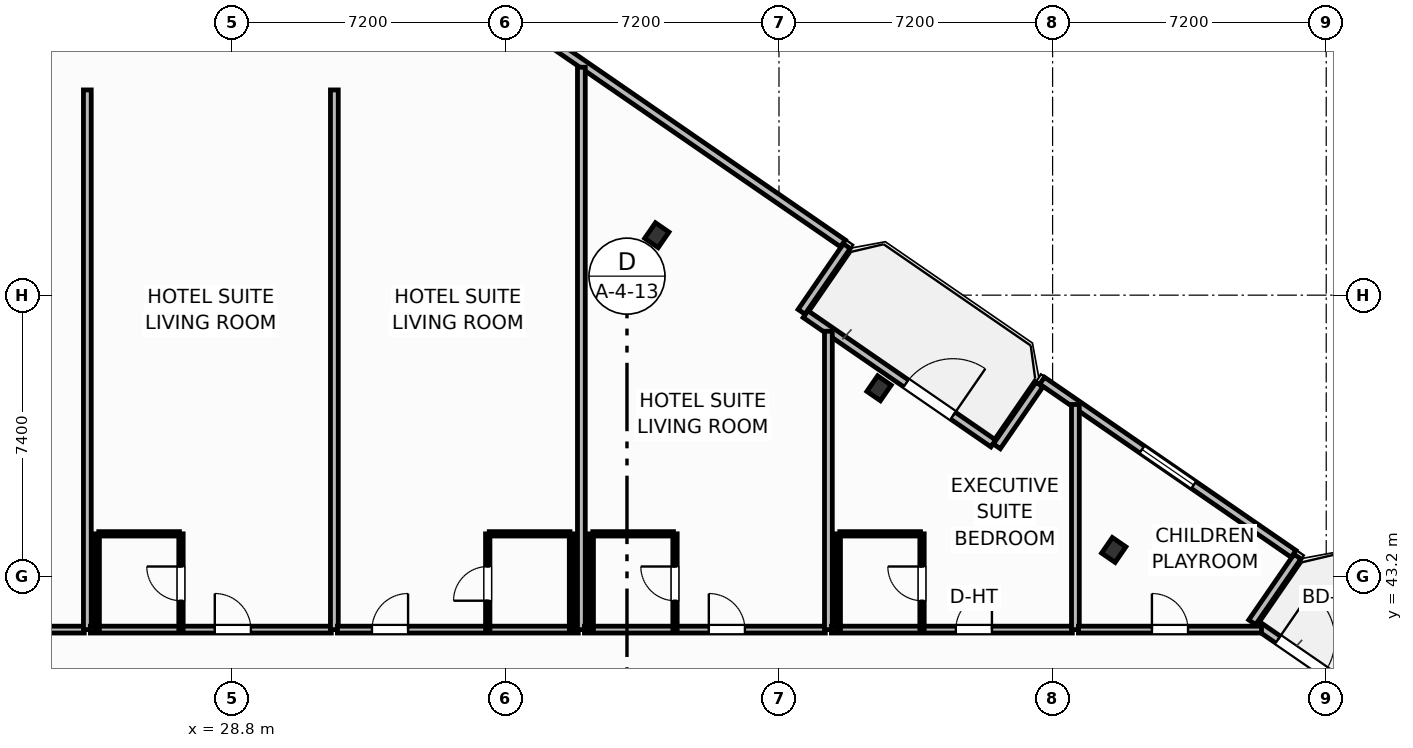
"""IFC4 building model, lengths in metres.
Left out: names, types, materials, properties, quantities, classifications, styles, units other than length and angle.
Written with IfcOpenShell. Run it as: python <this file> out.ifc"""

import sys

from ifc_helpers import new_model, si_unit, direction, frame, frame_2d, origin, origin_2d, place, context, subcontext, project, spatial, rectangle, i_section, extrude, element, fill, save


model = new_model("IFC4")
c1 = context("Model", 3, precision=1e-05, world=origin(), true_north=direction((0.0, 1.0)))
c2 = subcontext(c1, "Body", "Model", "MODEL_VIEW")
j1 = project(units=[si_unit("LENGTHUNIT", "METRE"), si_unit("PLANEANGLEUNIT", "RADIAN")], contexts=[c1])
p1 = place(None, origin())
s1 = spatial("IfcSite", under=j1, at=p1, CompositionType="ELEMENT")
p2 = place(p1, origin())
s2 = spatial("IfcBuilding", under=s1, at=p2, CompositionType="ELEMENT")
p3 = place(p2, frame((0.0, 0.0, 60.3)))
s3 = spatial("IfcBuildingStorey", under=s2, at=p3, CompositionType="ELEMENT", Elevation=60.3)
for number, where, z_axis, x_axis in (
    (1, (52.009, 43.896, 0.0), (0.0, 0.0, 1.0), (0.824, -0.567, 0.0)),
    (2, (45.833, 48.15, 0.0), (0.0, 0.0, 1.0), (0.824, -0.567, 0.0)),
    (3, (39.985, 52.177, 0.0), (0.0, 0.0, 1.0), (0.824, -0.567, 0.0)),
):
    element("IfcColumn", number, at=place(p3, frame(where, z_axis=z_axis, x_axis=x_axis)), inside=s3, PredefinedType="COLUMN", context=c2, shape_type="SweptSolid", body=[
        extrude(i_section(OverallWidth=0.432, OverallDepth=0.498, WebThickness=0.056, FlangeThickness=0.089, FilletRadius=0.025, at=origin_2d()), origin(), (0.0, 0.0, 1.0), 3.7),
    ])
p4 = place(p3, frame((43.898, 50.102, 0.0), z_axis=(0.0, 0.0, 1.0), x_axis=(0.823534636215, -0.567265989598, 0.0)))
e4 = element("IfcWall", 4, at=p4, inside=s3, PredefinedType="SOLIDWALL", context=c2, shape_type="SweptSolid", body=[
    extrude(rectangle(XDim=6.0, YDim=0.22, at=frame_2d((3.0, 0.0))), origin(), (0.0, 0.0, 1.0), 2.73),
])
p5 = place(p4, frame((3.212, 0.0, 0.0)))
e5 = element("IfcOpeningElement", 5, at=p5, cuts=e4, PredefinedType="OPENING", context=c2, shape_type="SweptSolid", body=[
    extrude(rectangle(XDim=1.5, YDim=2.25, at=frame_2d((0.75, 1.125))), frame((0.0, 0.12, 0.0), z_axis=(0.0, -1.0, 0.0), x_axis=(1.0, 0.0, 0.0)), (0.0, 0.0, 1.0), 0.24),
])
p6 = place(p3, frame((55.757, 41.933, 0.0), z_axis=(0.0, 0.0, 1.0), x_axis=(0.823534636215, -0.567265989598, 0.0)))
e6 = element("IfcWall", 6, at=p6, inside=s3, PredefinedType="SOLIDWALL", context=c2, shape_type="SweptSolid", body=[
    extrude(rectangle(XDim=6.0, YDim=0.22, at=frame_2d((3.0, 0.0))), origin(), (0.0, 0.0, 1.0), 2.73),
])
p7 = place(p6, frame((0.696, 0.0, 0.0)))
e7 = element("IfcOpeningElement", 7, at=p7, cuts=e6, PredefinedType="OPENING", context=c2, shape_type="SweptSolid", body=[
    extrude(rectangle(XDim=1.5, YDim=2.25, at=frame_2d((0.75, 1.125))), frame((0.0, 0.12, 0.0), z_axis=(0.0, -1.0, 0.0), x_axis=(1.0, 0.0, 0.0)), (0.0, 0.0, 1.0), 0.24),
])
p8 = place(p3, frame((55.653, 41.993, 0.0), z_axis=(0.0, 0.0, 1.0), x_axis=(0.567273696173, 0.823529327729, 0.0)))
e8 = element("IfcWall", 8, at=p8, inside=s3, PredefinedType="SOLIDWALL", context=c2, shape_type="SweptSolid", body=[
    extrude(rectangle(XDim=2.1, YDim=0.22, at=frame_2d((1.05, 0.0))), origin(), (0.0, 0.0, 1.0), 2.73),
])
p9 = place(p3, frame((56.741, 43.793, 0.0), z_axis=(0.0, 0.0, 1.0), x_axis=(-0.823530942962, 0.56727135128, 0.0)))
e9 = element("IfcWall", 9, at=p9, inside=s3, PredefinedType="SOLIDWALL", context=c2, shape_type="SweptSolid", body=[
    extrude(rectangle(XDim=8.035, YDim=0.22, at=frame_2d((4.018, 0.0))), origin(), (0.0, 0.0, 1.0), 2.73),
])
p10 = place(p9, frame((3.192, 0.0, 0.8)))
e10 = element("IfcOpeningElement", 10, at=p10, cuts=e9, PredefinedType="OPENING", context=c2, shape_type="SweptSolid", body=[
    extrude(rectangle(XDim=1.65, YDim=1.65, at=frame_2d((0.825, 0.825))), frame((0.0, 0.12, 0.0), z_axis=(0.0, -1.0, 0.0), x_axis=(1.0, 0.0, 0.0)), (0.0, 0.0, 1.0), 0.24),
])
p11 = place(p3, frame((50.053, 48.248, 0.0), z_axis=(0.0, 0.0, 1.0), x_axis=(-0.567273565974, -0.823529417415, 0.0)))
e11 = element("IfcWall", 11, at=p11, inside=s3, PredefinedType="SOLIDWALL", context=c2, shape_type="SweptSolid", body=[
    extrude(rectangle(XDim=1.975, YDim=0.22, at=frame_2d((0.988, 0.0))), origin(), (0.0, 0.0, 1.0), 2.73),
])
p12 = place(p3, frame((43.794, 50.161, 0.0), z_axis=(0.0, 0.0, 1.0), x_axis=(0.567352541689, 0.823475010816, 0.0)))
e12 = element("IfcWall", 12, at=p12, inside=s3, PredefinedType="SOLIDWALL", context=c2, shape_type="SweptSolid", body=[
    extrude(rectangle(XDim=2.1, YDim=0.22, at=frame_2d((1.05, 0.0))), origin(), (0.0, 0.0, 1.0), 2.73),
])
p13 = place(p3, frame((44.882, 51.962, 0.0), z_axis=(0.0, 0.0, 1.0), x_axis=(-0.823534427573, 0.567266292497, 0.0)))
e13 = element("IfcWall", 13, at=p13, inside=s3, PredefinedType="SOLIDWALL", context=c2, shape_type="SweptSolid", body=[
    extrude(rectangle(XDim=23.147, YDim=0.22, at=frame_2d((11.574, 0.0))), origin(), (0.0, 0.0, 1.0), 2.73),
])
p14 = place(p13, frame((10.749, 0.0, 0.8)))
e14 = element("IfcOpeningElement", 14, at=p14, cuts=e13, PredefinedType="OPENING", context=c2, shape_type="SweptSolid", body=[
    extrude(rectangle(XDim=1.65, YDim=1.65, at=frame_2d((0.825, 0.825))), frame((0.0, 0.12, 0.0), z_axis=(0.0, -1.0, 0.0), x_axis=(1.0, 0.0, 0.0)), (0.0, 0.0, 1.0), 0.24),
])
p15 = place(p3, frame((3.176, 41.8, 0.0), z_axis=(0.0, 0.0, 1.0), x_axis=(1.0, 0.0, 0.0)))
e15 = element("IfcWall", 15, at=p15, inside=s3, PredefinedType="PARTITIONING", context=c2, shape_type="SweptSolid", body=[
    extrude(rectangle(XDim=21.744, YDim=0.18, at=frame_2d((10.872, 0.0))), origin(), (0.0, 0.0, 1.0), 3.45),
])
p16 = place(p15, frame((18.101, 0.0, 0.0)))
e16 = element("IfcOpeningElement", 16, at=p16, cuts=e15, PredefinedType="OPENING", context=c2, shape_type="SweptSolid", body=[
    extrude(rectangle(XDim=0.95, YDim=2.15, at=frame_2d((0.475, 1.075))), frame((0.0, 0.1, 0.0), z_axis=(0.0, -1.0, 0.0), x_axis=(1.0, 0.0, 0.0)), (0.0, 0.0, 1.0), 0.2),
])
p17 = place(p3, frame((25.0, 41.8, 0.0), z_axis=(0.0, 0.0, 1.0), x_axis=(0.0, 1.0, 0.0)))
e17 = element("IfcWall", 17, at=p17, inside=s3, PredefinedType="PARTITIONING", context=c2, shape_type="SweptSolid", body=[
    extrude(rectangle(XDim=14.2, YDim=0.205, at=frame_2d((7.1, 0.0))), origin(), (0.0, 0.0, 1.0), 3.45),
])
p18 = place(p3, frame((25.08, 41.8, 0.0), z_axis=(0.0, 0.0, 1.0), x_axis=(1.0, 0.0, 0.0)))
e18 = element("IfcWall", 18, at=p18, inside=s3, PredefinedType="PARTITIONING", context=c2, shape_type="SweptSolid", body=[
    extrude(rectangle(XDim=6.34, YDim=0.18, at=frame_2d((3.17, 0.0))), origin(), (0.0, 0.0, 1.0), 3.45),
])
p19 = place(p18, frame((3.274, 0.0, 0.0)))
e19 = element("IfcOpeningElement", 19, at=p19, cuts=e18, PredefinedType="OPENING", context=c2, shape_type="SweptSolid", body=[
    extrude(rectangle(XDim=0.95, YDim=2.15, at=frame_2d((0.475, 1.075))), frame((0.0, 0.1, 0.0), z_axis=(0.0, -1.0, 0.0), x_axis=(1.0, 0.0, 0.0)), (0.0, 0.0, 1.0), 0.2),
])
p20 = place(p3, frame((25.3, 44.32, 0.0), z_axis=(0.0, 0.0, 1.0), x_axis=(1.0, 0.0, 0.0)))
e20 = element("IfcWall", 20, at=p20, inside=s3, PredefinedType="PARTITIONING", context=c2, shape_type="SweptSolid", body=[
    extrude(rectangle(XDim=2.124, YDim=0.115, at=frame_2d((1.062, 0.0))), origin(), (0.0, 0.0, 1.0), 3.45),
])
p21 = place(p3, frame((27.464, 41.8, 0.0), z_axis=(0.0, 0.0, 1.0), x_axis=(0.0, 1.0, 0.0)))
e21 = element("IfcWall", 21, at=p21, inside=s3, PredefinedType="PARTITIONING", context=c2, shape_type="SweptSolid", body=[
    extrude(rectangle(XDim=2.52, YDim=0.115, at=frame_2d((1.26, 0.0))), origin(), (0.0, 0.0, 1.0), 3.45),
])
p22 = place(p21, frame((0.76, 0.0, 0.0)))
e22 = element("IfcOpeningElement", 22, at=p22, cuts=e21, PredefinedType="OPENING", context=c2, shape_type="SweptSolid", body=[
    extrude(rectangle(XDim=0.9, YDim=2.05, at=frame_2d((0.45, 1.025))), frame((0.0, 0.067, 0.0), z_axis=(0.0, -1.0, 0.0), x_axis=(1.0, 0.0, 0.0)), (0.0, 0.0, 1.0), 0.135),
])
p23 = place(p3, frame((25.26, 41.8, 0.0), z_axis=(0.0, 0.0, 1.0), x_axis=(0.0, 1.0, 0.0)))
e23 = element("IfcWall", 23, at=p23, inside=s3, PredefinedType="PARTITIONING", context=c2, shape_type="SweptSolid", body=[
    extrude(rectangle(XDim=2.52, YDim=0.115, at=frame_2d((1.26, 0.0))), origin(), (0.0, 0.0, 1.0), 3.45),
])
p24 = place(p3, frame((31.5, 41.8, 0.0), z_axis=(0.0, 0.0, 1.0), x_axis=(0.0, 1.0, 0.0)))
e24 = element("IfcWall", 24, at=p24, inside=s3, PredefinedType="PARTITIONING", context=c2, shape_type="SweptSolid", body=[
    extrude(rectangle(XDim=14.2, YDim=0.205, at=frame_2d((7.1, 0.0))), origin(), (0.0, 0.0, 1.0), 3.45),
])
p25 = place(p3, frame((31.58, 41.8, 0.0), z_axis=(0.0, 0.0, 1.0), x_axis=(1.0, 0.0, 0.0)))
e25 = element("IfcWall", 25, at=p25, inside=s3, PredefinedType="PARTITIONING", context=c2, shape_type="SweptSolid", body=[
    extrude(rectangle(XDim=6.34, YDim=0.18, at=frame_2d((3.17, 0.0))), origin(), (0.0, 0.0, 1.0), 3.45),
])
p26 = place(p25, frame((0.91, 0.0, 0.0)))
e26 = element("IfcOpeningElement", 26, at=p26, cuts=e25, PredefinedType="OPENING", context=c2, shape_type="SweptSolid", body=[
    extrude(rectangle(XDim=0.95, YDim=2.15, at=frame_2d((0.475, 1.075))), frame((0.0, 0.1, 0.0), z_axis=(0.0, -1.0, 0.0), x_axis=(1.0, 0.0, 0.0)), (0.0, 0.0, 1.0), 0.2),
])
p27 = place(p3, frame((35.576, 44.32, 0.0), z_axis=(0.0, 0.0, 1.0), x_axis=(1.0, 0.0, 0.0)))
e27 = element("IfcWall", 27, at=p27, inside=s3, PredefinedType="PARTITIONING", context=c2, shape_type="SweptSolid", body=[
    extrude(rectangle(XDim=2.124, YDim=0.115, at=frame_2d((1.062, 0.0))), origin(), (0.0, 0.0, 1.0), 3.45),
])
p28 = place(p3, frame((35.536, 41.8, 0.0), z_axis=(0.0, 0.0, 1.0), x_axis=(0.0, 1.0, 0.0)))
e28 = element("IfcWall", 28, at=p28, inside=s3, PredefinedType="PARTITIONING", context=c2, shape_type="SweptSolid", body=[
    extrude(rectangle(XDim=2.52, YDim=0.115, at=frame_2d((1.26, 0.0))), origin(), (0.0, 0.0, 1.0), 3.45),
])
p29 = place(p28, frame((0.76, 0.0, 0.0)))
e29 = element("IfcOpeningElement", 29, at=p29, cuts=e28, PredefinedType="OPENING", context=c2, shape_type="SweptSolid", body=[
    extrude(rectangle(XDim=0.9, YDim=2.05, at=frame_2d((0.45, 1.025))), frame((0.0, 0.067, 0.0), z_axis=(0.0, -1.0, 0.0), x_axis=(1.0, 0.0, 0.0)), (0.0, 0.0, 1.0), 0.135),
])
p30 = place(p3, frame((37.74, 41.8, 0.0), z_axis=(0.0, 0.0, 1.0), x_axis=(0.0, 1.0, 0.0)))
e30 = element("IfcWall", 30, at=p30, inside=s3, PredefinedType="PARTITIONING", context=c2, shape_type="SweptSolid", body=[
    extrude(rectangle(XDim=2.52, YDim=0.115, at=frame_2d((1.26, 0.0))), origin(), (0.0, 0.0, 1.0), 3.45),
])
p31 = place(p3, frame((38.0, 41.8, 0.0), z_axis=(0.0, 0.0, 1.0), x_axis=(0.0, 1.0, 0.0)))
e31 = element("IfcWall", 31, at=p31, inside=s3, PredefinedType="PARTITIONING", context=c2, shape_type="SweptSolid", body=[
    extrude(rectangle(XDim=14.797, YDim=0.205, at=frame_2d((7.398, 0.0))), origin(), (0.0, 0.0, 1.0), 3.45),
])
p32 = place(p3, frame((38.08, 41.8, 0.0), z_axis=(0.0, 0.0, 1.0), x_axis=(1.0, 0.0, 0.0)))
e32 = element("IfcWall", 32, at=p32, inside=s3, PredefinedType="PARTITIONING", context=c2, shape_type="SweptSolid", body=[
    extrude(rectangle(XDim=6.34, YDim=0.18, at=frame_2d((3.17, 0.0))), origin(), (0.0, 0.0, 1.0), 3.45),
])
p33 = place(p32, frame((3.274, 0.0, 0.0)))
e33 = element("IfcOpeningElement", 33, at=p33, cuts=e32, PredefinedType="OPENING", context=c2, shape_type="SweptSolid", body=[
    extrude(rectangle(XDim=0.95, YDim=2.15, at=frame_2d((0.475, 1.075))), frame((0.0, 0.1, 0.0), z_axis=(0.0, -1.0, 0.0), x_axis=(1.0, 0.0, 0.0)), (0.0, 0.0, 1.0), 0.2),
])
p34 = place(p3, frame((38.3, 44.32, 0.0), z_axis=(0.0, 0.0, 1.0), x_axis=(1.0, 0.0, 0.0)))
e34 = element("IfcWall", 34, at=p34, inside=s3, PredefinedType="PARTITIONING", context=c2, shape_type="SweptSolid", body=[
    extrude(rectangle(XDim=2.124, YDim=0.115, at=frame_2d((1.062, 0.0))), origin(), (0.0, 0.0, 1.0), 3.45),
])
p35 = place(p3, frame((40.464, 41.8, 0.0), z_axis=(0.0, 0.0, 1.0), x_axis=(0.0, 1.0, 0.0)))
e35 = element("IfcWall", 35, at=p35, inside=s3, PredefinedType="PARTITIONING", context=c2, shape_type="SweptSolid", body=[
    extrude(rectangle(XDim=2.52, YDim=0.115, at=frame_2d((1.26, 0.0))), origin(), (0.0, 0.0, 1.0), 3.45),
])
p36 = place(p35, frame((0.76, 0.0, 0.0)))
e36 = element("IfcOpeningElement", 36, at=p36, cuts=e35, PredefinedType="OPENING", context=c2, shape_type="SweptSolid", body=[
    extrude(rectangle(XDim=0.9, YDim=2.05, at=frame_2d((0.45, 1.025))), frame((0.0, 0.067, 0.0), z_axis=(0.0, -1.0, 0.0), x_axis=(1.0, 0.0, 0.0)), (0.0, 0.0, 1.0), 0.135),
])
p37 = place(p3, frame((38.26, 41.8, 0.0), z_axis=(0.0, 0.0, 1.0), x_axis=(0.0, 1.0, 0.0)))
e37 = element("IfcWall", 37, at=p37, inside=s3, PredefinedType="PARTITIONING", context=c2, shape_type="SweptSolid", body=[
    extrude(rectangle(XDim=2.52, YDim=0.115, at=frame_2d((1.26, 0.0))), origin(), (0.0, 0.0, 1.0), 3.45),
])
p38 = place(p3, frame((44.5, 41.8, 0.0), z_axis=(0.0, 0.0, 1.0), x_axis=(0.0, 1.0, 0.0)))
e38 = element("IfcWall", 38, at=p38, inside=s3, PredefinedType="PARTITIONING", context=c2, shape_type="SweptSolid", body=[
    extrude(rectangle(XDim=7.851, YDim=0.205, at=frame_2d((3.925, 0.0))), origin(), (0.0, 0.0, 1.0), 3.45),
])
p39 = place(p3, frame((44.58, 41.8, 0.0), z_axis=(0.0, 0.0, 1.0), x_axis=(1.0, 0.0, 0.0)))
e39 = element("IfcWall", 39, at=p39, inside=s3, PredefinedType="PARTITIONING", context=c2, shape_type="SweptSolid", body=[
    extrude(rectangle(XDim=6.34, YDim=0.18, at=frame_2d((3.17, 0.0))), origin(), (0.0, 0.0, 1.0), 3.45),
])
p40 = place(p39, frame((3.274, 0.0, 0.0)))
e40 = element("IfcOpeningElement", 40, at=p40, cuts=e39, PredefinedType="OPENING", context=c2, shape_type="SweptSolid", body=[
    extrude(rectangle(XDim=0.95, YDim=2.15, at=frame_2d((0.475, 1.075))), frame((0.0, 0.1, 0.0), z_axis=(0.0, -1.0, 0.0), x_axis=(1.0, 0.0, 0.0)), (0.0, 0.0, 1.0), 0.2),
])
p41 = place(p3, frame((44.8, 44.32, 0.0), z_axis=(0.0, 0.0, 1.0), x_axis=(1.0, 0.0, 0.0)))
e41 = element("IfcWall", 41, at=p41, inside=s3, PredefinedType="PARTITIONING", context=c2, shape_type="SweptSolid", body=[
    extrude(rectangle(XDim=2.124, YDim=0.115, at=frame_2d((1.062, 0.0))), origin(), (0.0, 0.0, 1.0), 3.45),
])
p42 = place(p3, frame((46.964, 41.8, 0.0), z_axis=(0.0, 0.0, 1.0), x_axis=(0.0, 1.0, 0.0)))
e42 = element("IfcWall", 42, at=p42, inside=s3, PredefinedType="PARTITIONING", context=c2, shape_type="SweptSolid", body=[
    extrude(rectangle(XDim=2.52, YDim=0.115, at=frame_2d((1.26, 0.0))), origin(), (0.0, 0.0, 1.0), 2.58),
])
p43 = place(p42, frame((0.76, 0.0, 0.0)))
e43 = element("IfcOpeningElement", 43, at=p43, cuts=e42, PredefinedType="OPENING", context=c2, shape_type="SweptSolid", body=[
    extrude(rectangle(XDim=0.9, YDim=2.05, at=frame_2d((0.45, 1.025))), frame((0.0, 0.067, 0.0), z_axis=(0.0, -1.0, 0.0), x_axis=(1.0, 0.0, 0.0)), (0.0, 0.0, 1.0), 0.135),
])
p44 = place(p3, frame((44.76, 41.8, 0.0), z_axis=(0.0, 0.0, 1.0), x_axis=(0.0, 1.0, 0.0)))
e44 = element("IfcWall", 44, at=p44, inside=s3, PredefinedType="PARTITIONING", context=c2, shape_type="SweptSolid", body=[
    extrude(rectangle(XDim=2.52, YDim=0.115, at=frame_2d((1.26, 0.0))), origin(), (0.0, 0.0, 1.0), 3.45),
])
p45 = place(p3, frame((51.0, 41.8, 0.0), z_axis=(0.0, 0.0, 1.0), x_axis=(0.0, 1.0, 0.0)))
e45 = element("IfcWall", 45, at=p45, inside=s3, PredefinedType="PARTITIONING", context=c2, shape_type="SweptSolid", body=[
    extrude(rectangle(XDim=5.923, YDim=0.205, at=frame_2d((2.961, 0.0))), origin(), (0.0, 0.0, 1.0), 3.45),
])
p46 = place(p3, frame((51.08, 41.8, 0.0), z_axis=(0.0, 0.0, 1.0), x_axis=(1.0, 0.0, 0.0)))
e46 = element("IfcWall", 46, at=p46, inside=s3, PredefinedType="PARTITIONING", context=c2, shape_type="SweptSolid", body=[
    extrude(rectangle(XDim=4.817, YDim=0.18, at=frame_2d((2.408, 0.0))), origin(), (0.0, 0.0, 1.0), 3.45),
])
p47 = place(p46, frame((1.934, 0.0, 0.0)))
e47 = element("IfcOpeningElement", 47, at=p47, cuts=e46, PredefinedType="OPENING", context=c2, shape_type="SweptSolid", body=[
    extrude(rectangle(XDim=0.95, YDim=2.05, at=frame_2d((0.475, 1.025))), frame((0.0, 0.1, 0.0), z_axis=(0.0, -1.0, 0.0), x_axis=(1.0, 0.0, 0.0)), (0.0, 0.0, 1.0), 0.2),
])
p48 = place(p5, origin())
e48 = element("IfcDoor", 48, at=p48, inside=s3, OperationType="SINGLE_SWING_RIGHT", PredefinedType="DOOR", context=c2, shape_type="SweptSolid", body=[
    extrude(rectangle(XDim=1.5, YDim=2.25, at=frame_2d((0.75, 1.125))), frame((0.0, 0.025, 0.0), z_axis=(0.0, -1.0, 0.0), x_axis=(1.0, 0.0, 0.0)), (0.0, 0.0, 1.0), 0.05),
])
fill(e5, e48)
p49 = place(p7, origin())
e49 = element("IfcDoor", 49, at=p49, inside=s3, OperationType="SINGLE_SWING_LEFT", PredefinedType="DOOR", context=c2, shape_type="SweptSolid", body=[
    extrude(rectangle(XDim=1.5, YDim=2.25, at=frame_2d((0.75, 1.125))), frame((0.0, 0.025, 0.0), z_axis=(0.0, -1.0, 0.0), x_axis=(1.0, 0.0, 0.0)), (0.0, 0.0, 1.0), 0.05),
])
fill(e7, e49)
p50 = place(p10, origin())
e50 = element("IfcWindow", 50, at=p50, inside=s3, PartitioningType="SINGLE_PANEL", PredefinedType="WINDOW", context=c2, shape_type="SweptSolid", body=[
    extrude(rectangle(XDim=1.65, YDim=1.65, at=frame_2d((0.825, 0.825))), frame((0.0, 0.03, 0.0), z_axis=(0.0, -1.0, 0.0), x_axis=(1.0, 0.0, 0.0)), (0.0, 0.0, 1.0), 0.06),
])
fill(e10, e50)
p51 = place(p19, origin())
e51 = element("IfcDoor", 51, at=p51, inside=s3, OperationType="SINGLE_SWING_LEFT", PredefinedType="DOOR", context=c2, shape_type="SweptSolid", body=[
    extrude(rectangle(XDim=0.95, YDim=2.15, at=frame_2d((0.475, 1.075))), frame((0.0, 0.025, 0.0), z_axis=(0.0, -1.0, 0.0), x_axis=(1.0, 0.0, 0.0)), (0.0, 0.0, 1.0), 0.05),
])
fill(e19, e51)
p52 = place(p22, origin())
e52 = element("IfcDoor", 52, at=p52, inside=s3, OperationType="SINGLE_SWING_RIGHT", PredefinedType="DOOR", context=c2, shape_type="SweptSolid", body=[
    extrude(rectangle(XDim=0.9, YDim=2.05, at=frame_2d((0.45, 1.025))), frame((0.0, 0.025, 0.0), z_axis=(0.0, -1.0, 0.0), x_axis=(1.0, 0.0, 0.0)), (0.0, 0.0, 1.0), 0.05),
])
fill(e22, e52)
p53 = place(p26, origin())
e53 = element("IfcDoor", 53, at=p53, inside=s3, OperationType="SINGLE_SWING_RIGHT", PredefinedType="DOOR", context=c2, shape_type="SweptSolid", body=[
    extrude(rectangle(XDim=0.95, YDim=2.15, at=frame_2d((0.475, 1.075))), frame((0.0, 0.025, 0.0), z_axis=(0.0, -1.0, 0.0), x_axis=(1.0, 0.0, 0.0)), (0.0, 0.0, 1.0), 0.05),
])
fill(e26, e53)
p54 = place(p29, origin())
e54 = element("IfcDoor", 54, at=p54, inside=s3, OperationType="SINGLE_SWING_LEFT", PredefinedType="DOOR", context=c2, shape_type="SweptSolid", body=[
    extrude(rectangle(XDim=0.9, YDim=2.05, at=frame_2d((0.45, 1.025))), frame((0.0, 0.025, 0.0), z_axis=(0.0, -1.0, 0.0), x_axis=(1.0, 0.0, 0.0)), (0.0, 0.0, 1.0), 0.05),
])
fill(e29, e54)
p55 = place(p33, origin())
e55 = element("IfcDoor", 55, at=p55, inside=s3, OperationType="SINGLE_SWING_LEFT", PredefinedType="DOOR", context=c2, shape_type="SweptSolid", body=[
    extrude(rectangle(XDim=0.95, YDim=2.15, at=frame_2d((0.475, 1.075))), frame((0.0, 0.025, 0.0), z_axis=(0.0, -1.0, 0.0), x_axis=(1.0, 0.0, 0.0)), (0.0, 0.0, 1.0), 0.05),
])
fill(e33, e55)
p56 = place(p36, origin())
e56 = element("IfcDoor", 56, at=p56, inside=s3, OperationType="SINGLE_SWING_RIGHT", PredefinedType="DOOR", context=c2, shape_type="SweptSolid", body=[
    extrude(rectangle(XDim=0.9, YDim=2.05, at=frame_2d((0.45, 1.025))), frame((0.0, 0.025, 0.0), z_axis=(0.0, -1.0, 0.0), x_axis=(1.0, 0.0, 0.0)), (0.0, 0.0, 1.0), 0.05),
])
fill(e36, e56)
p57 = place(p40, origin())
e57 = element("IfcDoor", 57, at=p57, inside=s3, OperationType="SINGLE_SWING_RIGHT", PredefinedType="DOOR", context=c2, shape_type="SweptSolid", body=[
    extrude(rectangle(XDim=0.95, YDim=2.15, at=frame_2d((0.475, 1.075))), frame((0.0, 0.025, 0.0), z_axis=(0.0, -1.0, 0.0), x_axis=(1.0, 0.0, 0.0)), (0.0, 0.0, 1.0), 0.05),
])
fill(e40, e57)
p58 = place(p43, origin())
e58 = element("IfcDoor", 58, at=p58, inside=s3, OperationType="SINGLE_SWING_RIGHT", PredefinedType="DOOR", context=c2, shape_type="SweptSolid", body=[
    extrude(rectangle(XDim=0.9, YDim=2.05, at=frame_2d((0.45, 1.025))), frame((0.0, 0.025, 0.0), z_axis=(0.0, -1.0, 0.0), x_axis=(1.0, 0.0, 0.0)), (0.0, 0.0, 1.0), 0.05),
])
fill(e43, e58)
p59 = place(p47, origin())
e59 = element("IfcDoor", 59, at=p59, inside=s3, OperationType="SINGLE_SWING_LEFT", PredefinedType="DOOR", context=c2, shape_type="SweptSolid", body=[
    extrude(rectangle(XDim=0.95, YDim=2.05, at=frame_2d((0.475, 1.025))), frame((0.0, 0.025, 0.0), z_axis=(0.0, -1.0, 0.0), x_axis=(1.0, 0.0, 0.0)), (0.0, 0.0, 1.0), 0.05),
])
fill(e47, e59)
save(model, sys.argv[1])
